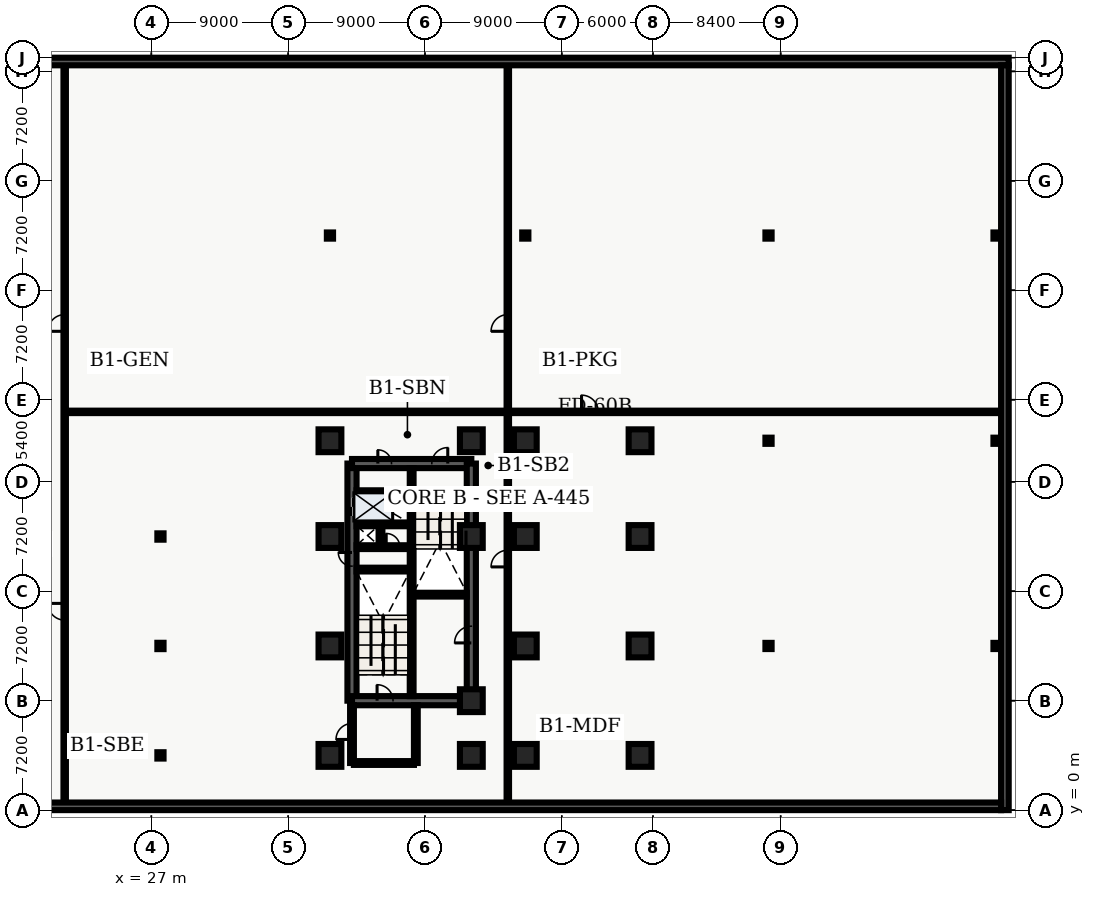
"""IFC4 building model, lengths in metres.
Left out: names, types, materials, properties, quantities, classifications, styles, units other than length and angle.
Written with IfcOpenShell. Run it as: python <this file> out.ifc"""

import sys

from ifc_helpers import new_model, entity, si_unit, converted_unit, direction, frame, origin_with_axes, origin_2d_with_axis, place, context, subcontext, project, spatial, polyline, rectangle, hollow_rectangle, i_section, outline, extrude, element, fill, save


model = new_model("IFC4")
c1 = context("Model", 3, precision=1e-05, world=origin_with_axes(), true_north=direction((0.0, 1.0)))
c2 = subcontext(c1, "Body", "Model", "MODEL_VIEW")
j1 = project(units=[si_unit("LENGTHUNIT", "METRE"), converted_unit("PLANEANGLEUNIT", "DEGREE", entity("IfcPlaneAngleMeasure", 0.017), si_unit("PLANEANGLEUNIT", "RADIAN"), dimensions=[0, 0, 0, 0, 0, 0, 0])], contexts=[c1])
p1 = place(None, origin_with_axes())
s1 = spatial("IfcSite", under=j1, at=p1, CompositionType="ELEMENT")
p2 = place(p1, origin_with_axes())
s2 = spatial("IfcBuilding", under=s1, at=p2, CompositionType="ELEMENT")
p3 = place(p2, frame((0.0, 0.0, -4.8), z_axis=(0.0, 0.0, 1.0), x_axis=(1.0, 0.0, 0.0)))
s3 = spatial("IfcBuildingStorey", under=s2, at=p3, CompositionType="ELEMENT", Elevation=-4.8)
p4 = place(p3, frame((40.2, 7.2, 0.0), z_axis=(0.0, 0.0, 1.0), x_axis=(0.0, 1.0, 0.0)))
e1 = element("IfcWall", 1, at=p4, inside=s3, PredefinedType="SHEAR", context=c2, shape_type="SweptSolid", body=[
    extrude(outline(polyline([(0.0, -0.3), (15.6, -0.3), (15.6, 0.3), (0.0, 0.3), (0.0, -0.3)])), origin_with_axes(), (0.0, 0.0, 1.0), 4.48),
])
p5 = place(p4, frame((12.75, 0.0, 0.0), z_axis=(0.0, 0.0, 1.0), x_axis=(1.0, 0.0, 0.0)))
e2 = element("IfcOpeningElement", 2, at=p5, cuts=e1, PredefinedType="OPENING", context=c2, shape_type="SweptSolid", body=[
    extrude(rectangle(XDim=1.2, YDim=0.62, at=origin_2d_with_axis()), origin_with_axes(), (0.0, 0.0, 1.0), 2.15),
])
p6 = place(p4, frame((9.3, 0.0, 0.0), z_axis=(0.0, 0.0, 1.0), x_axis=(1.0, 0.0, 0.0)))
e3 = element("IfcOpeningElement", 3, at=p6, cuts=e1, PredefinedType="OPENING", context=c2, shape_type="SweptSolid", body=[
    extrude(rectangle(XDim=0.9, YDim=0.62, at=origin_2d_with_axis()), origin_with_axes(), (0.0, 0.0, 1.0), 2.15),
])
p7 = place(p3, frame((40.2, 7.2, 0.0), z_axis=(0.0, 0.0, 1.0), x_axis=(1.0, 0.0, 0.0)))
e4 = element("IfcWall", 4, at=p7, inside=s3, PredefinedType="SHEAR", context=c2, shape_type="SweptSolid", body=[
    extrude(outline(polyline([(0.0, -0.3), (7.85, -0.3), (7.85, 0.3), (0.0, 0.3), (0.0, -0.3)])), origin_with_axes(), (0.0, 0.0, 1.0), 4.48),
])
p8 = place(p7, frame((2.175, 0.0, 0.0), z_axis=(0.0, 0.0, 1.0), x_axis=(1.0, 0.0, 0.0)))
e5 = element("IfcOpeningElement", 5, at=p8, cuts=e4, PredefinedType="OPENING", context=c2, shape_type="SweptSolid", body=[
    extrude(rectangle(XDim=1.05, YDim=0.62, at=origin_2d_with_axis()), origin_with_axes(), (0.0, 0.0, 1.0), 2.15),
])
p9 = place(p3, frame((40.2, 22.8, 0.0), z_axis=(0.0, 0.0, 1.0), x_axis=(1.0, 0.0, 0.0)))
e6 = element("IfcWall", 6, at=p9, inside=s3, PredefinedType="SHEAR", context=c2, shape_type="SweptSolid", body=[
    extrude(outline(polyline([(0.0, -0.3), (7.85, -0.3), (7.85, 0.3), (0.0, 0.3), (0.0, -0.3)])), origin_with_axes(), (0.0, 0.0, 1.0), 4.48),
])
p10 = place(p9, frame((5.775, 0.0, 0.0), z_axis=(0.0, 0.0, 1.0), x_axis=(1.0, 0.0, 0.0)))
e7 = element("IfcOpeningElement", 7, at=p10, cuts=e6, PredefinedType="OPENING", context=c2, shape_type="SweptSolid", body=[
    extrude(rectangle(XDim=1.05, YDim=0.62, at=origin_2d_with_axis()), origin_with_axes(), (0.0, 0.0, 1.0), 2.15),
])
p11 = place(p9, frame((2.15, 0.0, 0.0), z_axis=(0.0, 0.0, 1.0), x_axis=(1.0, 0.0, 0.0)))
e8 = element("IfcOpeningElement", 8, at=p11, cuts=e6, PredefinedType="OPENING", context=c2, shape_type="SweptSolid", body=[
    extrude(rectangle(XDim=0.9, YDim=0.62, at=origin_2d_with_axis()), origin_with_axes(), (0.0, 0.0, 1.0), 2.15),
])
p12 = place(p3, frame((48.05, 7.2, 0.0), z_axis=(0.0, 0.0, 1.0), x_axis=(0.0, 1.0, 0.0)))
e9 = element("IfcWall", 9, at=p12, inside=s3, PredefinedType="SHEAR", context=c2, shape_type="SweptSolid", body=[
    extrude(outline(polyline([(0.0, -0.3), (15.6, -0.3), (15.6, 0.3), (0.0, 0.3), (0.0, -0.3)])), origin_with_axes(), (0.0, 0.0, 1.0), 4.48),
])
p13 = place(p12, frame((4.35, 0.0, 0.0), z_axis=(0.0, 0.0, 1.0), x_axis=(1.0, 0.0, 0.0)))
e10 = element("IfcOpeningElement", 10, at=p13, cuts=e9, PredefinedType="OPENING", context=c2, shape_type="SweptSolid", body=[
    extrude(rectangle(XDim=1.1, YDim=0.62, at=origin_2d_with_axis()), origin_with_axes(), (0.0, 0.0, 1.0), 2.15),
])
p14 = place(p3, frame((44.125, 7.5, 0.0), z_axis=(0.0, 0.0, 1.0), x_axis=(0.0, 1.0, 0.0)))
e11 = element("IfcWall", 11, at=p14, inside=s3, PredefinedType="SHEAR", context=c2, shape_type="SweptSolid", body=[
    extrude(outline(polyline([(0.0, -0.125), (15.0, -0.125), (15.0, 0.125), (0.0, 0.125), (0.0, -0.125)])), origin_with_axes(), (0.0, 0.0, 1.0), 4.48),
])
for number, where, z_axis, x_axis in (
    (12, (40.5, 15.825, 0.0), (0.0, 0.0, 1.0), (1.0, 0.0, 0.0)),
    (13, (44.25, 14.175, 0.0), (0.0, 0.0, 1.0), (1.0, 0.0, 0.0)),
):
    element("IfcWall", number, at=place(p3, frame(where, z_axis=z_axis, x_axis=x_axis)), inside=s3, PredefinedType="SHEAR", context=c2, shape_type="SweptSolid", body=[
        extrude(outline(polyline([(0.0, -0.125), (3.5, -0.125), (3.5, 0.125), (0.0, 0.125), (0.0, -0.125)])), origin_with_axes(), (0.0, 0.0, 1.0), 4.48),
    ])
p15 = place(p3, frame((40.5, 17.3, 0.0), z_axis=(0.0, 0.0, 1.0), x_axis=(1.0, 0.0, 0.0)))
e14 = element("IfcWall", 14, at=p15, inside=s3, PredefinedType="SOLIDWALL", context=c2, shape_type="SweptSolid", body=[
    extrude(outline(polyline([(0.0, -0.125), (3.5, -0.125), (3.5, 0.125), (0.0, 0.125), (0.0, -0.125)])), origin_with_axes(), (0.0, 0.0, 1.0), 3.52),
])
p16 = place(p15, frame((2.4, 0.0, 0.0), z_axis=(0.0, 0.0, 1.0), x_axis=(1.0, 0.0, 0.0)))
e15 = element("IfcOpeningElement", 15, at=p16, cuts=e14, PredefinedType="OPENING", context=c2, shape_type="SweptSolid", body=[
    extrude(rectangle(XDim=0.9, YDim=0.27, at=origin_2d_with_axis()), origin_with_axes(), (0.0, 0.0, 1.0), 2.15),
])
p17 = place(p3, frame((40.5, 18.8, 0.0), z_axis=(0.0, 0.0, 1.0), x_axis=(1.0, 0.0, 0.0)))
e16 = element("IfcWall", 16, at=p17, inside=s3, PredefinedType="SOLIDWALL", context=c2, shape_type="SweptSolid", body=[
    extrude(outline(polyline([(0.0, -0.125), (3.5, -0.125), (3.5, 0.125), (0.0, 0.125), (0.0, -0.125)])), origin_with_axes(), (0.0, 0.0, 1.0), 3.52),
])
p18 = place(p3, frame((42.075, 17.43, 0.0), z_axis=(0.0, 0.0, 1.0), x_axis=(0.0, 1.0, 0.0)))
e17 = element("IfcWall", 17, at=p18, inside=s3, PredefinedType="SOLIDWALL", context=c2, shape_type="SweptSolid", body=[
    extrude(outline(polyline([(0.0, -0.125), (1.24, -0.125), (1.24, 0.125), (0.0, 0.125), (0.0, -0.125)])), origin_with_axes(), (0.0, 0.0, 1.0), 3.52),
])
p19 = place(p3, frame((40.2, 3.1, 0.0), z_axis=(0.0, 0.0, 1.0), x_axis=(0.0, 1.0, 0.0)))
e18 = element("IfcWall", 18, at=p19, inside=s3, PredefinedType="SOLIDWALL", context=c2, shape_type="SweptSolid", body=[
    extrude(outline(polyline([(0.0, -0.125), (3.8, -0.125), (3.8, 0.125), (0.0, 0.125), (0.0, -0.125)])), origin_with_axes(), (0.0, 0.0, 1.0), 3.52),
])
p20 = place(p19, frame((2.075, 0.0, 0.0), z_axis=(0.0, 0.0, 1.0), x_axis=(1.0, 0.0, 0.0)))
e19 = element("IfcOpeningElement", 19, at=p20, cuts=e18, PredefinedType="OPENING", context=c2, shape_type="SweptSolid", body=[
    extrude(rectangle(XDim=1.05, YDim=0.27, at=origin_2d_with_axis()), origin_with_axes(), (0.0, 0.0, 1.0), 2.15),
])
p21 = place(p3, frame((40.325, 3.1, 0.0), z_axis=(0.0, 0.0, 1.0), x_axis=(1.0, 0.0, 0.0)))
e20 = element("IfcWall", 20, at=p21, inside=s3, PredefinedType="SOLIDWALL", context=c2, shape_type="SweptSolid", body=[
    extrude(outline(polyline([(0.0, -0.125), (3.95, -0.125), (3.95, 0.125), (0.0, 0.125), (0.0, -0.125)])), origin_with_axes(), (0.0, 0.0, 1.0), 3.52),
])
p22 = place(p3, frame((44.4, 3.1, 0.0), z_axis=(0.0, 0.0, 1.0), x_axis=(0.0, 1.0, 0.0)))
e21 = element("IfcWall", 21, at=p22, inside=s3, PredefinedType="SOLIDWALL", context=c2, shape_type="SweptSolid", body=[
    extrude(outline(polyline([(0.0, -0.125), (3.8, -0.125), (3.8, 0.125), (0.0, 0.125), (0.0, -0.125)])), origin_with_axes(), (0.0, 0.0, 1.0), 3.52),
])
for number, where, z_axis, x_axis in (
    (22, (27.6, 3.6, 0.0), (0.0, 0.0, 1.0), (1.0, 0.0, 0.0)),
    (23, (27.6, 10.8, 0.0), (0.0, 0.0, 1.0), (1.0, 0.0, 0.0)),
    (24, (27.6, 18.0, 0.0), (0.0, 0.0, 1.0), (1.0, 0.0, 0.0)),
):
    element("IfcColumn", number, at=place(p3, frame(where, z_axis=z_axis, x_axis=x_axis)), inside=s3, PredefinedType="COLUMN", context=c2, shape_type="SweptSolid", body=[
        extrude(i_section(OverallWidth=0.406, OverallDepth=0.416, WebThickness=0.03, FlangeThickness=0.048, FilletRadius=0.022, at=origin_2d_with_axis()), origin_with_axes(), (0.0, 0.0, 1.0), 4.8),
    ])
for number, where, z_axis, x_axis in (
    (25, (38.75, 3.6, 0.0), (0.0, 0.0, 1.0), (1.0, 0.0, 0.0)),
    (26, (38.75, 10.8, 0.0), (0.0, 0.0, 1.0), (1.0, 0.0, 0.0)),
    (27, (38.75, 18.0, 0.0), (0.0, 0.0, 1.0), (1.0, 0.0, 0.0)),
    (28, (38.75, 24.3, 0.0), (0.0, 0.0, 1.0), (1.0, 0.0, 0.0)),
    (29, (48.05, 3.6, 0.0), (0.0, 0.0, 1.0), (1.0, 0.0, 0.0)),
    (30, (48.05, 7.2, 0.0), (0.0, 0.0, 1.0), (1.0, 0.0, 0.0)),
    (31, (48.05, 18.0, 0.0), (0.0, 0.0, 1.0), (1.0, 0.0, 0.0)),
    (32, (48.05, 24.3, 0.0), (0.0, 0.0, 1.0), (1.0, 0.0, 0.0)),
    (33, (51.6, 3.6, 0.0), (0.0, 0.0, 1.0), (1.0, 0.0, 0.0)),
    (34, (51.6, 10.8, 0.0), (0.0, 0.0, 1.0), (1.0, 0.0, 0.0)),
    (35, (51.6, 18.0, 0.0), (0.0, 0.0, 1.0), (1.0, 0.0, 0.0)),
    (36, (51.6, 24.3, 0.0), (0.0, 0.0, 1.0), (1.0, 0.0, 0.0)),
    (37, (59.15, 3.6, 0.0), (0.0, 0.0, 1.0), (1.0, 0.0, 0.0)),
    (38, (59.15, 10.8, 0.0), (0.0, 0.0, 1.0), (1.0, 0.0, 0.0)),
    (39, (59.15, 18.0, 0.0), (0.0, 0.0, 1.0), (1.0, 0.0, 0.0)),
    (40, (59.15, 24.3, 0.0), (0.0, 0.0, 1.0), (1.0, 0.0, 0.0)),
):
    element("IfcColumn", number, at=place(p3, frame(where, z_axis=z_axis, x_axis=x_axis)), inside=s3, PredefinedType="COLUMN", context=c2, shape_type="SweptSolid", body=[
        extrude(rectangle(XDim=1.5, YDim=1.5, at=origin_2d_with_axis()), origin_with_axes(), (0.0, 0.0, 1.0), 4.8),
    ])
for number, where, z_axis, x_axis in (
    (41, (67.6, 10.8, 0.0), (0.0, 0.0, 1.0), (1.0, 0.0, 0.0)),
    (42, (67.6, 24.3, 0.0), (0.0, 0.0, 1.0), (1.0, 0.0, 0.0)),
    (43, (67.6, 37.8, 0.0), (0.0, 0.0, 1.0), (1.0, 0.0, 0.0)),
    (44, (38.75, 37.8, 0.0), (0.0, 0.0, 1.0), (1.0, 0.0, 0.0)),
    (45, (51.6, 37.8, 0.0), (0.0, 0.0, 1.0), (1.0, 0.0, 0.0)),
):
    element("IfcColumn", number, at=place(p3, frame(where, z_axis=z_axis, x_axis=x_axis)), inside=s3, PredefinedType="COLUMN", context=c2, shape_type="SweptSolid", body=[
        extrude(hollow_rectangle(XDim=0.406, YDim=0.406, WallThickness=0.015, InnerFilletRadius=0.015, OuterFilletRadius=0.03, at=origin_2d_with_axis()), origin_with_axes(), (0.0, 0.0, 1.0), 4.8),
    ])
for number, where, z_axis, x_axis in (
    (46, (82.6, 10.8, 0.0), (0.0, 0.0, 1.0), (1.0, 0.0, 0.0)),
    (47, (82.6, 24.3, 0.0), (0.0, 0.0, 1.0), (1.0, 0.0, 0.0)),
    (48, (82.6, 37.8, 0.0), (0.0, 0.0, 1.0), (1.0, 0.0, 0.0)),
):
    element("IfcColumn", number, at=place(p3, frame(where, z_axis=z_axis, x_axis=x_axis)), inside=s3, PredefinedType="COLUMN", context=c2, shape_type="SweptSolid", body=[
        extrude(hollow_rectangle(XDim=0.406, YDim=0.406, WallThickness=0.015, InnerFilletRadius=0.015, OuterFilletRadius=0.03, at=origin_2d_with_axis()), origin_with_axes(), (0.0, 0.0, 1.0), 4.68),
    ])
p23 = place(p3, frame((40.5, 20.96, 0.0), z_axis=(0.0, 0.0, 1.0), x_axis=(1.0, 0.0, 0.0)))
e49 = element("IfcWall", 49, at=p23, inside=s3, PredefinedType="PARTITIONING", context=c2, shape_type="SweptSolid", body=[
    extrude(outline(polyline([(0.0, -0.08), (3.5, -0.08), (3.5, 0.08), (0.0, 0.08), (0.0, -0.08)])), origin_with_axes(), (0.0, 0.0, 1.0), 3.2),
])
p24 = place(p3, frame((21.3, 0.5, 0.0), z_axis=(0.0, 0.0, 1.0), x_axis=(0.0, 1.0, 0.0)))
e50 = element("IfcWall", 50, at=p24, inside=s3, PredefinedType="PARTITIONING", context=c2, shape_type="SweptSolid", body=[
    extrude(outline(polyline([(0.0, -0.08), (48.5, -0.08), (48.5, 0.08), (0.0, 0.08), (0.0, -0.08)])), origin_with_axes(), (0.0, 0.0, 1.0), 3.2),
])
p25 = place(p24, frame((31.55, 0.0, 0.0), z_axis=(0.0, 0.0, 1.0), x_axis=(1.0, 0.0, 0.0)))
e51 = element("IfcOpeningElement", 51, at=p25, cuts=e50, PredefinedType="OPENING", context=c2, shape_type="SweptSolid", body=[
    extrude(rectangle(XDim=1.1, YDim=0.18, at=origin_2d_with_axis()), origin_with_axes(), (0.0, 0.0, 1.0), 2.15),
])
p26 = place(p24, frame((12.55, 0.0, 0.0), z_axis=(0.0, 0.0, 1.0), x_axis=(1.0, 0.0, 0.0)))
e52 = element("IfcOpeningElement", 52, at=p26, cuts=e50, PredefinedType="OPENING", context=c2, shape_type="SweptSolid", body=[
    extrude(rectangle(XDim=1.1, YDim=0.18, at=origin_2d_with_axis()), origin_with_axes(), (0.0, 0.0, 1.0), 2.15),
])
p27 = place(p3, frame((21.3, 26.2, 0.0), z_axis=(0.0, 0.0, 1.0), x_axis=(1.0, 0.0, 0.0)))
e53 = element("IfcWall", 53, at=p27, inside=s3, PredefinedType="PARTITIONING", context=c2, shape_type="SweptSolid", body=[
    extrude(outline(polyline([(0.0, -0.08), (61.6, -0.08), (61.6, 0.08), (0.0, 0.08), (0.0, -0.08)])), origin_with_axes(), (0.0, 0.0, 1.0), 3.2),
])
p28 = place(p27, frame((34.55, 0.0, 0.0), z_axis=(0.0, 0.0, 1.0), x_axis=(1.0, 0.0, 0.0)))
e54 = element("IfcOpeningElement", 54, at=p28, cuts=e53, PredefinedType="OPENING", context=c2, shape_type="SweptSolid", body=[
    extrude(rectangle(XDim=1.1, YDim=0.18, at=origin_2d_with_axis()), origin_with_axes(), (0.0, 0.0, 1.0), 2.15),
])
p29 = place(p3, frame((50.45, 0.5, 0.0), z_axis=(0.0, 0.0, 1.0), x_axis=(0.0, 1.0, 0.0)))
e55 = element("IfcWall", 55, at=p29, inside=s3, PredefinedType="PARTITIONING", context=c2, shape_type="SweptSolid", body=[
    extrude(outline(polyline([(0.0, -0.08), (48.5, -0.08), (48.5, 0.08), (0.0, 0.08), (0.0, -0.08)])), origin_with_axes(), (0.0, 0.0, 1.0), 3.2),
])
p30 = place(p29, frame((31.55, 0.0, 0.0), z_axis=(0.0, 0.0, 1.0), x_axis=(1.0, 0.0, 0.0)))
e56 = element("IfcOpeningElement", 56, at=p30, cuts=e55, PredefinedType="OPENING", context=c2, shape_type="SweptSolid", body=[
    extrude(rectangle(XDim=1.1, YDim=0.18, at=origin_2d_with_axis()), origin_with_axes(), (0.0, 0.0, 1.0), 2.15),
])
p31 = place(p29, frame((16.05, 0.0, 0.0), z_axis=(0.0, 0.0, 1.0), x_axis=(1.0, 0.0, 0.0)))
e57 = element("IfcOpeningElement", 57, at=p31, cuts=e55, PredefinedType="OPENING", context=c2, shape_type="SweptSolid", body=[
    extrude(rectangle(XDim=1.1, YDim=0.18, at=origin_2d_with_axis()), origin_with_axes(), (0.0, 0.0, 1.0), 2.15),
])
p32 = place(p3, frame((0.5, 49.25, 0.0), z_axis=(0.0, 0.0, 1.0), x_axis=(1.0, 0.0, 0.0)))
e58 = element("IfcWall", 58, at=p32, inside=s3, PredefinedType="USERDEFINED", context=c2, shape_type="SweptSolid", body=[
    extrude(outline(polyline([(0.0, -0.25), (82.9, -0.25), (82.9, 0.25), (0.0, 0.25), (0.0, -0.25)])), origin_with_axes(), (0.0, 0.0, 1.0), 4.48),
])
p33 = place(p3, frame((83.15, 49.0, 0.0), z_axis=(0.0, 0.0, 1.0), x_axis=(0.0, -1.0, 0.0)))
e59 = element("IfcWall", 59, at=p33, inside=s3, PredefinedType="USERDEFINED", context=c2, shape_type="SweptSolid", body=[
    extrude(outline(polyline([(0.0, -0.25), (49.0, -0.25), (49.0, 0.25), (0.0, 0.25), (0.0, -0.25)])), origin_with_axes(), (0.0, 0.0, 1.0), 4.48),
])
p34 = place(p3, frame((82.9, 0.25, 0.0), z_axis=(0.0, 0.0, 1.0), x_axis=(-1.0, 0.0, 0.0)))
e60 = element("IfcWall", 60, at=p34, inside=s3, PredefinedType="USERDEFINED", context=c2, shape_type="SweptSolid", body=[
    extrude(outline(polyline([(0.0, -0.25), (82.9, -0.25), (82.9, 0.25), (0.0, 0.25), (0.0, -0.25)])), origin_with_axes(), (0.0, 0.0, 1.0), 4.48),
])
p35 = place(p4, frame((12.75, 0.0, 0.0), z_axis=(0.0, 0.0, 1.0), x_axis=(1.0, 0.0, 0.0)))
e61 = element("IfcDoor", 61, at=p35, inside=s3, OperationType="DOUBLE_DOOR_SLIDING", PredefinedType="DOOR", context=c2, shape_type="SweptSolid", body=[
    extrude(rectangle(XDim=1.2, YDim=0.09, at=origin_2d_with_axis()), origin_with_axes(), (0.0, 0.0, 1.0), 2.15),
])
fill(e2, e61)
p36 = place(p4, frame((9.3, 0.0, 0.0), z_axis=(0.0, 0.0, 1.0), x_axis=(1.0, 0.0, 0.0)))
e62 = element("IfcDoor", 62, at=p36, inside=s3, OperationType="SINGLE_SWING_RIGHT", PredefinedType="DOOR", context=c2, shape_type="SweptSolid", body=[
    extrude(rectangle(XDim=0.9, YDim=0.09, at=origin_2d_with_axis()), origin_with_axes(), (0.0, 0.0, 1.0), 2.15),
])
fill(e3, e62)
p37 = place(p15, frame((2.4, 0.0, 0.0), z_axis=(0.0, 0.0, 1.0), x_axis=(1.0, 0.0, 0.0)))
e63 = element("IfcDoor", 63, at=p37, inside=s3, OperationType="SINGLE_SWING_LEFT", PredefinedType="DOOR", context=c2, shape_type="SweptSolid", body=[
    extrude(rectangle(XDim=0.9, YDim=0.09, at=origin_2d_with_axis()), origin_with_axes(), (0.0, 0.0, 1.0), 2.15),
])
fill(e15, e63)
p38 = place(p7, frame((2.175, 0.0, 0.0), z_axis=(0.0, 0.0, 1.0), x_axis=(1.0, 0.0, 0.0)))
e64 = element("IfcDoor", 64, at=p38, inside=s3, OperationType="SINGLE_SWING_LEFT", PredefinedType="DOOR", context=c2, shape_type="SweptSolid", body=[
    extrude(rectangle(XDim=1.05, YDim=0.09, at=origin_2d_with_axis()), origin_with_axes(), (0.0, 0.0, 1.0), 2.15),
])
fill(e5, e64)
p39 = place(p9, frame((5.775, 0.0, 0.0), z_axis=(0.0, 0.0, 1.0), x_axis=(1.0, 0.0, 0.0)))
e65 = element("IfcDoor", 65, at=p39, inside=s3, OperationType="SINGLE_SWING_RIGHT", PredefinedType="DOOR", context=c2, shape_type="SweptSolid", body=[
    extrude(rectangle(XDim=1.05, YDim=0.09, at=origin_2d_with_axis()), origin_with_axes(), (0.0, 0.0, 1.0), 2.15),
])
fill(e7, e65)
p40 = place(p19, frame((2.075, 0.0, 0.0), z_axis=(0.0, 0.0, 1.0), x_axis=(1.0, 0.0, 0.0)))
e66 = element("IfcDoor", 66, at=p40, inside=s3, OperationType="SINGLE_SWING_LEFT", PredefinedType="DOOR", context=c2, shape_type="SweptSolid", body=[
    extrude(rectangle(XDim=1.05, YDim=0.09, at=origin_2d_with_axis()), origin_with_axes(), (0.0, 0.0, 1.0), 2.15),
])
fill(e19, e66)
p41 = place(p9, frame((2.15, 0.0, 0.0), z_axis=(0.0, 0.0, 1.0), x_axis=(1.0, 0.0, 0.0)))
e67 = element("IfcDoor", 67, at=p41, inside=s3, OperationType="SINGLE_SWING_LEFT", PredefinedType="DOOR", context=c2, shape_type="SweptSolid", body=[
    extrude(rectangle(XDim=0.9, YDim=0.09, at=origin_2d_with_axis()), origin_with_axes(), (0.0, 0.0, 1.0), 2.15),
])
fill(e8, e67)
p42 = place(p12, frame((4.35, 0.0, 0.0), z_axis=(0.0, 0.0, 1.0), x_axis=(1.0, 0.0, 0.0)))
e68 = element("IfcDoor", 68, at=p42, inside=s3, OperationType="SINGLE_SWING_LEFT", PredefinedType="DOOR", context=c2, shape_type="SweptSolid", body=[
    extrude(rectangle(XDim=1.1, YDim=0.09, at=origin_2d_with_axis()), origin_with_axes(), (0.0, 0.0, 1.0), 2.15),
])
fill(e10, e68)
p43 = place(p27, frame((34.55, 0.0, 0.0), z_axis=(0.0, 0.0, 1.0), x_axis=(1.0, 0.0, 0.0)))
e69 = element("IfcDoor", 69, at=p43, inside=s3, OperationType="SINGLE_SWING_LEFT", PredefinedType="DOOR", context=c2, shape_type="SweptSolid", body=[
    extrude(rectangle(XDim=1.1, YDim=0.09, at=origin_2d_with_axis()), origin_with_axes(), (0.0, 0.0, 1.0), 2.15),
])
fill(e54, e69)
p44 = place(p24, frame((31.55, 0.0, 0.0), z_axis=(0.0, 0.0, 1.0), x_axis=(1.0, 0.0, 0.0)))
e70 = element("IfcDoor", 70, at=p44, inside=s3, OperationType="SINGLE_SWING_LEFT", PredefinedType="DOOR", context=c2, shape_type="SweptSolid", body=[
    extrude(rectangle(XDim=1.1, YDim=0.09, at=origin_2d_with_axis()), origin_with_axes(), (0.0, 0.0, 1.0), 2.15),
])
fill(e51, e70)
p45 = place(p29, frame((31.55, 0.0, 0.0), z_axis=(0.0, 0.0, 1.0), x_axis=(1.0, 0.0, 0.0)))
e71 = element("IfcDoor", 71, at=p45, inside=s3, OperationType="SINGLE_SWING_LEFT", PredefinedType="DOOR", context=c2, shape_type="SweptSolid", body=[
    extrude(rectangle(XDim=1.1, YDim=0.09, at=origin_2d_with_axis()), origin_with_axes(), (0.0, 0.0, 1.0), 2.15),
])
fill(e56, e71)
p46 = place(p29, frame((16.05, 0.0, 0.0), z_axis=(0.0, 0.0, 1.0), x_axis=(1.0, 0.0, 0.0)))
e72 = element("IfcDoor", 72, at=p46, inside=s3, OperationType="SINGLE_SWING_LEFT", PredefinedType="DOOR", context=c2, shape_type="SweptSolid", body=[
    extrude(rectangle(XDim=1.1, YDim=0.09, at=origin_2d_with_axis()), origin_with_axes(), (0.0, 0.0, 1.0), 2.15),
])
fill(e57, e72)
p47 = place(p24, frame((12.55, 0.0, 0.0), z_axis=(0.0, 0.0, 1.0), x_axis=(1.0, 0.0, 0.0)))
e73 = element("IfcDoor", 73, at=p47, inside=s3, OperationType="SINGLE_SWING_RIGHT", PredefinedType="DOOR", context=c2, shape_type="SweptSolid", body=[
    extrude(rectangle(XDim=1.1, YDim=0.09, at=origin_2d_with_axis()), origin_with_axes(), (0.0, 0.0, 1.0), 2.15),
])
fill(e52, e73)
save(model, sys.argv[1])
